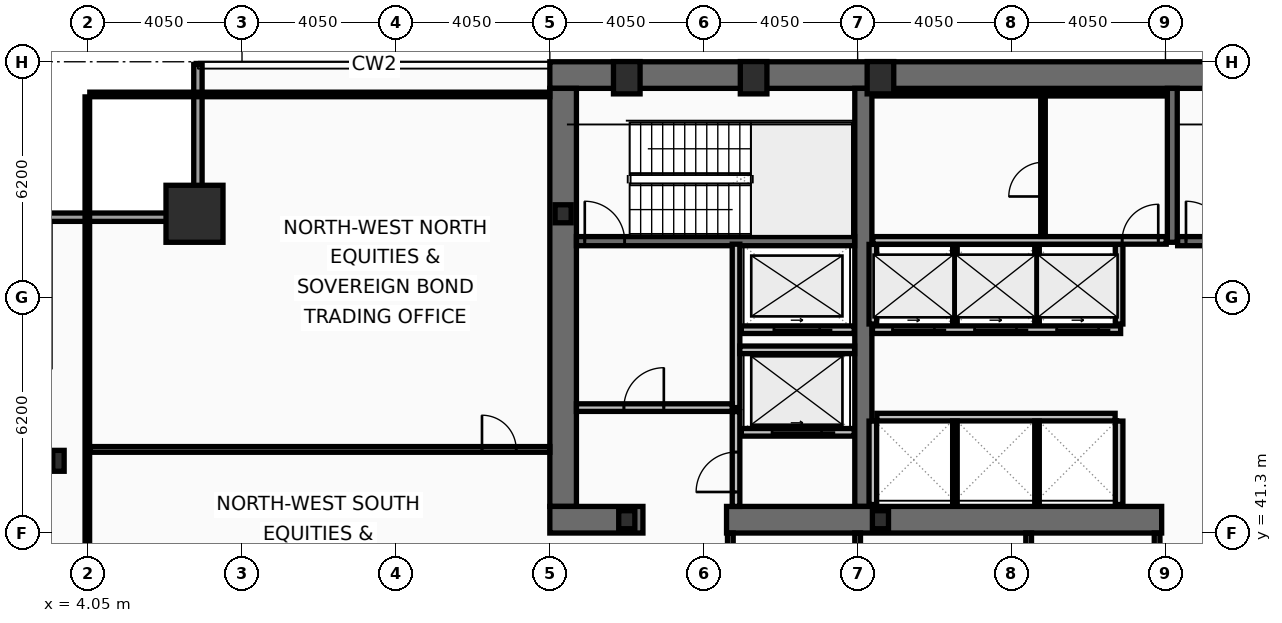
"""IFC4 building model, lengths in metres.
Left out: names, types, materials, properties, quantities, classifications, styles, units other than length and angle.
Written with IfcOpenShell. Run it as: python <this file> out.ifc"""

import sys

from ifc_helpers import new_model, si_unit, direction, frame, frame_2d, origin, origin_2d, place, context, subcontext, project, spatial, rectangle, hollow_rectangle, i_section, extrude, element, fill, save


model = new_model("IFC4")
c1 = context("Model", 3, precision=1e-05, world=origin(), true_north=direction((0.0, 1.0)))
c2 = subcontext(c1, "Body", "Model", "MODEL_VIEW")
j1 = project(units=[si_unit("LENGTHUNIT", "METRE"), si_unit("PLANEANGLEUNIT", "RADIAN")], contexts=[c1])
p1 = place(None, origin())
s1 = spatial("IfcSite", under=j1, at=p1, CompositionType="ELEMENT")
p2 = place(p1, origin())
s2 = spatial("IfcBuilding", under=s1, at=p2, CompositionType="ELEMENT")
p3 = place(p2, frame((0.0, 0.0, 90.6)))
s3 = spatial("IfcBuildingStorey", under=s2, at=p3, CompositionType="ELEMENT", Elevation=90.6)
p4 = place(p3, frame((16.2, 53.35, 0.0), z_axis=(0.0, 0.0, 1.0), x_axis=(1.0, 0.0, 0.0)))
e1 = element("IfcWall", 1, at=p4, inside=s3, PredefinedType="SHEAR", context=c2, shape_type="SweptSolid", body=[
    extrude(rectangle(XDim=40.5, YDim=0.7, at=frame_2d((20.25, 0.0))), origin(), (0.0, 0.0, 1.0), 3.82),
])
p5 = place(p3, frame((16.55, 42.0, 0.0), z_axis=(0.0, 0.0, 1.0), x_axis=(0.0, 1.0, 0.0)))
e2 = element("IfcWall", 2, at=p5, inside=s3, PredefinedType="SHEAR", context=c2, shape_type="SweptSolid", body=[
    extrude(rectangle(XDim=11.0, YDim=0.7, at=frame_2d((5.5, 0.0))), origin(), (0.0, 0.0, 1.0), 3.82),
])
p6 = place(p3, frame((24.45, 42.0, 0.0), z_axis=(0.0, 0.0, 1.0), x_axis=(0.0, 1.0, 0.0)))
e3 = element("IfcWall", 3, at=p6, inside=s3, PredefinedType="SHEAR", context=c2, shape_type="SweptSolid", body=[
    extrude(rectangle(XDim=11.0, YDim=0.45, at=frame_2d((5.5, 0.0))), origin(), (0.0, 0.0, 1.0), 3.82),
])
p7 = place(p3, frame((18.65, 41.65, 0.0), z_axis=(0.0, 0.0, 1.0), x_axis=(-1.0, 0.0, 0.0)))
e4 = element("IfcWall", 4, at=p7, inside=s3, PredefinedType="SHEAR", context=c2, shape_type="SweptSolid", body=[
    extrude(rectangle(XDim=2.45, YDim=0.7, at=frame_2d((1.225, 0.0))), origin(), (0.0, 0.0, 1.0), 3.82),
])
p8 = place(p3, frame((32.3, 41.65, 0.0), z_axis=(0.0, 0.0, 1.0), x_axis=(-1.0, 0.0, 0.0)))
e5 = element("IfcWall", 5, at=p8, inside=s3, PredefinedType="SHEAR", context=c2, shape_type="SweptSolid", body=[
    extrude(rectangle(XDim=11.45, YDim=0.7, at=frame_2d((5.725, 0.0))), origin(), (0.0, 0.0, 1.0), 3.82),
])
p9 = place(p3, frame((32.58, 48.95, 0.0), z_axis=(0.0, 0.0, 1.0), x_axis=(0.0, 1.0, 0.0)))
e6 = element("IfcWall", 6, at=p9, inside=s3, PredefinedType="SHEAR", context=c2, shape_type="SweptSolid", body=[
    extrude(rectangle(XDim=4.05, YDim=0.26, at=frame_2d((2.025, 0.0))), origin(), (0.0, 0.0, 1.0), 3.82),
])
p10 = place(p3, frame((16.9, 48.98, 0.0), z_axis=(0.0, 0.0, 1.0), x_axis=(1.0, 0.0, 0.0)))
e7 = element("IfcWall", 7, at=p10, inside=s3, PredefinedType="SHEAR", context=c2, shape_type="SweptSolid", body=[
    extrude(rectangle(XDim=7.32, YDim=0.24, at=frame_2d((3.66, 0.0))), origin(), (0.0, 0.0, 1.0), 3.82),
])
p11 = place(p10, frame((0.22, 0.0, 0.0)))
e8 = element("IfcOpeningElement", 8, at=p11, cuts=e7, PredefinedType="OPENING", context=c2, shape_type="SweptSolid", body=[
    extrude(rectangle(XDim=1.05, YDim=2.15, at=frame_2d((0.525, 1.075))), frame((0.0, 0.13, 0.0), z_axis=(0.0, -1.0, 0.0), x_axis=(1.0, 0.0, 0.0)), (0.0, 0.0, 1.0), 0.26),
])
p12 = place(p3, frame((32.72, 48.98, 0.0), z_axis=(0.0, 0.0, 1.0), x_axis=(1.0, 0.0, 0.0)))
e9 = element("IfcWall", 9, at=p12, inside=s3, PredefinedType="SHEAR", context=c2, shape_type="SweptSolid", body=[
    extrude(rectangle(XDim=7.56, YDim=0.24, at=frame_2d((3.78, 0.0))), origin(), (0.0, 0.0, 1.0), 3.82),
])
p13 = place(p12, frame((0.22, 0.0, 0.0)))
e10 = element("IfcOpeningElement", 10, at=p13, cuts=e9, PredefinedType="OPENING", context=c2, shape_type="SweptSolid", body=[
    extrude(rectangle(XDim=1.05, YDim=2.15, at=frame_2d((0.525, 1.075))), frame((0.0, 0.13, 0.0), z_axis=(0.0, -1.0, 0.0), x_axis=(1.0, 0.0, 0.0)), (0.0, 0.0, 1.0), 0.26),
])
p14 = place(p3, frame((6.85, 49.7, 0.0), z_axis=(0.0, 0.0, 1.0), x_axis=(1.0, 0.0, 0.0)))
e11 = element("IfcColumn", 11, at=p14, inside=s3, PredefinedType="COLUMN", context=c2, shape_type="SweptSolid", body=[
    extrude(hollow_rectangle(XDim=1.5, YDim=1.5, WallThickness=0.07, at=origin_2d()), origin(), (0.0, 0.0, 1.0), 4.0),
])
for number, where, z_axis, x_axis in (
    (12, (18.225, 53.28, 0.0), (0.0, 0.0, 1.0), (1.0, 0.0, 0.0)),
    (13, (21.562, 53.28, 0.0), (0.0, 0.0, 1.0), (1.0, 0.0, 0.0)),
    (14, (24.9, 53.28, 0.0), (0.0, 0.0, 1.0), (1.0, 0.0, 0.0)),
):
    element("IfcColumn", number, at=place(p3, frame(where, z_axis=z_axis, x_axis=x_axis)), inside=s3, PredefinedType="COLUMN", context=c2, shape_type="SweptSolid", body=[
        extrude(hollow_rectangle(XDim=0.7, YDim=0.85, WallThickness=0.05, at=origin_2d()), origin(), (0.0, 0.0, 1.0), 4.0),
    ])
p15 = place(p3, frame((3.27, 43.2, 0.0), z_axis=(0.0, 0.0, 1.0), x_axis=(1.0, 0.0, 0.0)))
e15 = element("IfcColumn", 15, at=p15, inside=s3, PredefinedType="COLUMN", context=c2, shape_type="SweptSolid", body=[
    extrude(i_section(OverallWidth=0.3, OverallDepth=0.55, WebThickness=0.015, FlangeThickness=0.029, at=origin_2d()), origin(), (0.0, 0.0, 1.0), 4.0),
])
for number, where, z_axis, x_axis in (
    (16, (16.55, 49.7, 0.0), (0.0, 0.0, 1.0), (1.0, 0.0, 0.0)),
    (17, (18.225, 41.65, 0.0), (0.0, 0.0, 1.0), (1.0, 0.0, 0.0)),
    (18, (24.9, 41.65, 0.0), (0.0, 0.0, 1.0), (1.0, 0.0, 0.0)),
):
    element("IfcColumn", number, at=place(p3, frame(where, z_axis=z_axis, x_axis=x_axis)), inside=s3, PredefinedType="COLUMN", context=c2, shape_type="SweptSolid", body=[
        extrude(i_section(OverallWidth=0.424, OverallDepth=0.474, WebThickness=0.048, FlangeThickness=0.077, at=origin_2d()), origin(), (0.0, 0.0, 1.0), 4.0),
    ])
p16 = place(p3, frame((2.83, 49.61, 0.0), z_axis=(0.0, 0.0, 1.0), x_axis=(1.0, 0.0, 0.0)))
e19 = element("IfcWall", 19, at=p16, inside=s3, PredefinedType="SOLIDWALL", context=c2, shape_type="SweptSolid", body=[
    extrude(rectangle(XDim=4.22, YDim=0.22, at=frame_2d((2.11, 0.0))), origin(), (0.0, 0.0, 1.0), 3.16),
])
p17 = place(p3, frame((6.94, 49.72, 0.0), z_axis=(0.0, 0.0, 1.0), x_axis=(0.0, 1.0, 0.0)))
e20 = element("IfcWall", 20, at=p17, inside=s3, PredefinedType="SOLIDWALL", context=c2, shape_type="SweptSolid", body=[
    extrude(rectangle(XDim=3.91, YDim=0.22, at=frame_2d((1.955, 0.0))), origin(), (0.0, 0.0, 1.0), 3.16),
])
p18 = place(p3, frame((24.21, 43.95, 0.0), z_axis=(0.0, 0.0, 1.0), x_axis=(-1.0, 0.0, 0.0)))
e21 = element("IfcWall", 21, at=p18, inside=s3, PredefinedType="PARTITIONING", context=c2, shape_type="SweptSolid", body=[
    extrude(rectangle(XDim=2.97, YDim=0.2, at=frame_2d((1.485, 0.0))), origin(), (0.0, 0.0, 1.0), 3.82),
])
p19 = place(p18, frame((0.86, 0.0, 0.0)))
e22 = element("IfcOpeningElement", 22, at=p19, cuts=e21, PredefinedType="OPENING", context=c2, shape_type="SweptSolid", body=[
    extrude(rectangle(XDim=1.3, YDim=2.18, at=frame_2d((0.65, 1.09))), frame((0.0, 0.11, 0.0), z_axis=(0.0, -1.0, 0.0), x_axis=(1.0, 0.0, 0.0)), (0.0, 0.0, 1.0), 0.22),
])
p20 = place(p3, frame((24.21, 46.65, 0.0), z_axis=(0.0, 0.0, 1.0), x_axis=(-1.0, 0.0, 0.0)))
e23 = element("IfcWall", 23, at=p20, inside=s3, PredefinedType="PARTITIONING", context=c2, shape_type="SweptSolid", body=[
    extrude(rectangle(XDim=2.97, YDim=0.2, at=frame_2d((1.485, 0.0))), origin(), (0.0, 0.0, 1.0), 3.82),
])
p21 = place(p20, frame((0.91, 0.0, 0.0)))
e24 = element("IfcOpeningElement", 24, at=p21, cuts=e23, PredefinedType="OPENING", context=c2, shape_type="SweptSolid", body=[
    extrude(rectangle(XDim=1.2, YDim=2.18, at=frame_2d((0.6, 1.09))), frame((0.0, 0.11, 0.0), z_axis=(0.0, -1.0, 0.0), x_axis=(1.0, 0.0, 0.0)), (0.0, 0.0, 1.0), 0.22),
])
p22 = place(p3, frame((31.22, 46.65, 0.0), z_axis=(0.0, 0.0, 1.0), x_axis=(-1.0, 0.0, 0.0)))
e25 = element("IfcWall", 25, at=p22, inside=s3, PredefinedType="PARTITIONING", context=c2, shape_type="SweptSolid", body=[
    extrude(rectangle(XDim=6.53, YDim=0.2, at=frame_2d((3.265, 0.0))), origin(), (0.0, 0.0, 1.0), 3.82),
])
p23 = place(p22, frame((4.9, 0.0, 0.0)))
e26 = element("IfcOpeningElement", 26, at=p23, cuts=e25, PredefinedType="OPENING", context=c2, shape_type="SweptSolid", body=[
    extrude(rectangle(XDim=1.1, YDim=2.18, at=frame_2d((0.55, 1.09))), frame((0.0, 0.11, 0.0), z_axis=(0.0, -1.0, 0.0), x_axis=(1.0, 0.0, 0.0)), (0.0, 0.0, 1.0), 0.22),
])
p24 = place(p22, frame((2.74, 0.0, 0.0)))
e27 = element("IfcOpeningElement", 27, at=p24, cuts=e25, PredefinedType="OPENING", context=c2, shape_type="SweptSolid", body=[
    extrude(rectangle(XDim=1.1, YDim=2.18, at=frame_2d((0.55, 1.09))), frame((0.0, 0.11, 0.0), z_axis=(0.0, -1.0, 0.0), x_axis=(1.0, 0.0, 0.0)), (0.0, 0.0, 1.0), 0.22),
])
p25 = place(p22, frame((0.58, 0.0, 0.0)))
e28 = element("IfcOpeningElement", 28, at=p25, cuts=e25, PredefinedType="OPENING", context=c2, shape_type="SweptSolid", body=[
    extrude(rectangle(XDim=1.1, YDim=2.18, at=frame_2d((0.55, 1.09))), frame((0.0, 0.11, 0.0), z_axis=(0.0, -1.0, 0.0), x_axis=(1.0, 0.0, 0.0)), (0.0, 0.0, 1.0), 0.22),
])
p26 = place(p3, frame((21.1, 44.6, 0.0), z_axis=(0.0, 0.0, 1.0), x_axis=(0.0, 1.0, 0.0)))
e29 = element("IfcWall", 29, at=p26, inside=s3, PredefinedType="PARTITIONING", context=c2, shape_type="SweptSolid", body=[
    extrude(rectangle(XDim=4.3, YDim=0.2, at=frame_2d((2.15, 0.0))), origin(), (0.0, 0.0, 1.0), 3.82),
])
p27 = place(p3, frame((16.9, 44.6, 0.0), z_axis=(0.0, 0.0, 1.0), x_axis=(1.0, 0.0, 0.0)))
e30 = element("IfcWall", 30, at=p27, inside=s3, PredefinedType="PARTITIONING", context=c2, shape_type="SweptSolid", body=[
    extrude(rectangle(XDim=4.1, YDim=0.2, at=frame_2d((2.05, 0.0))), origin(), (0.0, 0.0, 1.0), 3.82),
])
p28 = place(p27, frame((1.25, 0.0, 0.0)))
e31 = element("IfcOpeningElement", 31, at=p28, cuts=e30, PredefinedType="OPENING", context=c2, shape_type="SweptSolid", body=[
    extrude(rectangle(XDim=1.05, YDim=2.15, at=frame_2d((0.525, 1.075))), frame((0.0, 0.11, 0.0), z_axis=(0.0, -1.0, 0.0), x_axis=(1.0, 0.0, 0.0)), (0.0, 0.0, 1.0), 0.22),
])
p29 = place(p3, frame((21.2, 46.12, 0.0), z_axis=(0.0, 0.0, 1.0), x_axis=(1.0, 0.0, 0.0)))
e32 = element("IfcWall", 32, at=p29, inside=s3, PredefinedType="PARTITIONING", context=c2, shape_type="SweptSolid", body=[
    extrude(rectangle(XDim=3.02, YDim=0.2, at=frame_2d((1.51, 0.0))), origin(), (0.0, 0.0, 1.0), 3.82),
])
p30 = place(p3, frame((21.1, 42.0, 0.0), z_axis=(0.0, 0.0, 1.0), x_axis=(0.0, 1.0, 0.0)))
e33 = element("IfcWall", 33, at=p30, inside=s3, PredefinedType="PARTITIONING", context=c2, shape_type="SweptSolid", body=[
    extrude(rectangle(XDim=2.495, YDim=0.2, at=frame_2d((1.248, 0.0))), origin(), (0.0, 0.0, 1.0), 3.82),
])
p31 = place(p30, frame((0.38, 0.0, 0.0)))
e34 = element("IfcOpeningElement", 34, at=p31, cuts=e33, PredefinedType="OPENING", context=c2, shape_type="SweptSolid", body=[
    extrude(rectangle(XDim=1.05, YDim=2.15, at=frame_2d((0.525, 1.075))), frame((0.0, 0.11, 0.0), z_axis=(0.0, -1.0, 0.0), x_axis=(1.0, 0.0, 0.0)), (0.0, 0.0, 1.0), 0.22),
])
for number, where, z_axis, x_axis in (
    (35, (24.7, 46.8, 0.0), (0.0, 0.0, 1.0), (0.0, 1.0, 0.0)),
    (36, (31.18, 46.8, 0.0), (0.0, 0.0, 1.0), (0.0, 1.0, 0.0)),
):
    element("IfcWall", number, at=place(p3, frame(where, z_axis=z_axis, x_axis=x_axis)), inside=s3, PredefinedType="PARTITIONING", context=c2, shape_type="SweptSolid", body=[
        extrude(rectangle(XDim=2.095, YDim=0.2, at=frame_2d((1.047, 0.0))), origin(), (0.0, 0.0, 1.0), 3.82),
    ])
for number, where, z_axis, x_axis in (
    (37, (26.86, 46.8, 0.0), (0.0, 0.0, 1.0), (0.0, 1.0, 0.0)),
    (38, (29.02, 46.8, 0.0), (0.0, 0.0, 1.0), (0.0, 1.0, 0.0)),
):
    element("IfcWall", number, at=place(p3, frame(where, z_axis=z_axis, x_axis=x_axis)), inside=s3, PredefinedType="PARTITIONING", context=c2, shape_type="SweptSolid", body=[
        extrude(rectangle(XDim=2.095, YDim=0.12, at=frame_2d((1.047, 0.0))), origin(), (0.0, 0.0, 1.0), 3.82),
    ])
p32 = place(p3, frame((24.805, 44.35, 0.0), z_axis=(0.0, 0.0, 1.0), x_axis=(1.0, 0.0, 0.0)))
e39 = element("IfcWall", 39, at=p32, inside=s3, PredefinedType="PARTITIONING", context=c2, shape_type="SweptSolid", body=[
    extrude(rectangle(XDim=6.27, YDim=0.2, at=frame_2d((3.135, 0.0))), origin(), (0.0, 0.0, 1.0), 3.82),
])
for number, where, z_axis, x_axis in (
    (40, (24.7, 42.05, 0.0), (0.0, 0.0, 1.0), (0.0, 1.0, 0.0)),
    (41, (31.18, 42.05, 0.0), (0.0, 0.0, 1.0), (0.0, 1.0, 0.0)),
):
    element("IfcWall", number, at=place(p3, frame(where, z_axis=z_axis, x_axis=x_axis)), inside=s3, PredefinedType="PARTITIONING", context=c2, shape_type="SweptSolid", body=[
        extrude(rectangle(XDim=2.195, YDim=0.2, at=frame_2d((1.098, 0.0))), origin(), (0.0, 0.0, 1.0), 3.82),
    ])
for number, where, z_axis, x_axis in (
    (42, (26.86, 42.05, 0.0), (0.0, 0.0, 1.0), (0.0, 1.0, 0.0)),
    (43, (29.02, 42.05, 0.0), (0.0, 0.0, 1.0), (0.0, 1.0, 0.0)),
):
    element("IfcWall", number, at=place(p3, frame(where, z_axis=z_axis, x_axis=x_axis)), inside=s3, PredefinedType="PARTITIONING", context=c2, shape_type="SweptSolid", body=[
        extrude(rectangle(XDim=2.195, YDim=0.12, at=frame_2d((1.098, 0.0))), origin(), (0.0, 0.0, 1.0), 3.82),
    ])
p33 = place(p3, frame((24.7, 52.86, 0.0), z_axis=(0.0, 0.0, 1.0), x_axis=(1.0, 0.0, 0.0)))
e44 = element("IfcWall", 44, at=p33, inside=s3, PredefinedType="PARTITIONING", context=c2, shape_type="SweptSolid", body=[
    extrude(rectangle(XDim=7.72, YDim=0.12, at=frame_2d((3.86, 0.0))), origin(), (0.0, 0.0, 1.0), 3.82),
])
p34 = place(p3, frame((24.7, 49.0, 0.0), z_axis=(0.0, 0.0, 1.0), x_axis=(1.0, 0.0, 0.0)))
e45 = element("IfcWall", 45, at=p34, inside=s3, PredefinedType="PARTITIONING", context=c2, shape_type="SweptSolid", body=[
    extrude(rectangle(XDim=7.72, YDim=0.2, at=frame_2d((3.86, 0.0))), origin(), (0.0, 0.0, 1.0), 3.82),
])
p35 = place(p34, frame((6.56, 0.0, 0.0)))
e46 = element("IfcOpeningElement", 46, at=p35, cuts=e45, PredefinedType="OPENING", context=c2, shape_type="SweptSolid", body=[
    extrude(rectangle(XDim=0.95, YDim=2.1, at=frame_2d((0.475, 1.05))), frame((0.0, 0.11, 0.0), z_axis=(0.0, -1.0, 0.0), x_axis=(1.0, 0.0, 0.0)), (0.0, 0.0, 1.0), 0.22),
])
p36 = place(p3, frame((29.177, 49.105, 0.0), z_axis=(0.0, 0.0, 1.0), x_axis=(0.0, 1.0, 0.0)))
e47 = element("IfcWall", 47, at=p36, inside=s3, PredefinedType="PARTITIONING", context=c2, shape_type="SweptSolid", body=[
    extrude(rectangle(XDim=3.69, YDim=0.12, at=frame_2d((1.845, 0.0))), origin(), (0.0, 0.0, 1.0), 3.82),
])
p37 = place(p36, frame((1.05, 0.0, 0.0)))
e48 = element("IfcOpeningElement", 48, at=p37, cuts=e47, PredefinedType="OPENING", context=c2, shape_type="SweptSolid", body=[
    extrude(rectangle(XDim=0.9, YDim=2.05, at=frame_2d((0.45, 1.025))), frame((0.0, 0.07, 0.0), z_axis=(0.0, -1.0, 0.0), x_axis=(1.0, 0.0, 0.0)), (0.0, 0.0, 1.0), 0.14),
])
for number, where, z_axis, x_axis in (
    (49, (20.95, 38.28, 0.0), (0.0, 0.0, 1.0), (0.0, 1.0, 0.0)),
    (50, (24.3, 38.28, 0.0), (0.0, 0.0, 1.0), (0.0, 1.0, 0.0)),
    (51, (28.8, 38.28, 0.0), (0.0, 0.0, 1.0), (0.0, 1.0, 0.0)),
    (52, (32.18, 38.28, 0.0), (0.0, 0.0, 1.0), (0.0, 1.0, 0.0)),
):
    element("IfcWall", number, at=place(p3, frame(where, z_axis=z_axis, x_axis=x_axis)), inside=s3, PredefinedType="PARTITIONING", context=c2, shape_type="SweptSolid", body=[
        extrude(rectangle(XDim=3.02, YDim=0.15, at=frame_2d((1.51, 0.0))), origin(), (0.0, 0.0, 1.0), 3.82),
    ])
p38 = place(p3, frame((4.095, 43.5, 0.0), z_axis=(0.0, 0.0, 1.0), x_axis=(1.0, 0.0, 0.0)))
e53 = element("IfcWall", 53, at=p38, inside=s3, PredefinedType="PARTITIONING", context=c2, shape_type="SweptSolid", body=[
    extrude(rectangle(XDim=12.105, YDim=0.15, at=frame_2d((6.052, 0.0))), origin(), (0.0, 0.0, 1.0), 3.01),
])
p39 = place(p38, frame((10.32, 0.0, 0.0)))
e54 = element("IfcOpeningElement", 54, at=p39, cuts=e53, PredefinedType="OPENING", context=c2, shape_type="SweptSolid", body=[
    extrude(rectangle(XDim=0.9, YDim=2.05, at=frame_2d((0.45, 1.025))), frame((0.0, 0.085, 0.0), z_axis=(0.0, -1.0, 0.0), x_axis=(1.0, 0.0, 0.0)), (0.0, 0.0, 1.0), 0.17),
])
p40 = place(p3, frame((4.03, 10.665, 0.0), z_axis=(0.0, 0.0, 1.0), x_axis=(0.0, 1.0, 0.0)))
e55 = element("IfcWall", 55, at=p40, inside=s3, PredefinedType="PARTITIONING", context=c2, shape_type="SweptSolid", body=[
    extrude(rectangle(XDim=42.11, YDim=0.12, at=frame_2d((21.055, 0.0))), origin(), (0.0, 0.0, 1.0), 3.01),
])
p41 = place(p3, frame((4.095, 52.84, 0.0), z_axis=(0.0, 0.0, 1.0), x_axis=(1.0, 0.0, 0.0)))
e56 = element("IfcWall", 56, at=p41, inside=s3, PredefinedType="PARTITIONING", context=c2, shape_type="SweptSolid", body=[
    extrude(rectangle(XDim=12.105, YDim=0.12, at=frame_2d((6.052, 0.0))), origin(), (0.0, 0.0, 1.0), 3.82),
])
p42 = place(p11, origin())
e57 = element("IfcDoor", 57, at=p42, inside=s3, OperationType="SINGLE_SWING_LEFT", PredefinedType="DOOR", context=c2, shape_type="SweptSolid", body=[
    extrude(rectangle(XDim=1.05, YDim=2.15, at=frame_2d((0.525, 1.075))), frame((0.0, 0.025, 0.0), z_axis=(0.0, -1.0, 0.0), x_axis=(1.0, 0.0, 0.0)), (0.0, 0.0, 1.0), 0.05),
])
fill(e8, e57)
p43 = place(p13, origin())
e58 = element("IfcDoor", 58, at=p43, inside=s3, OperationType="SINGLE_SWING_LEFT", PredefinedType="DOOR", context=c2, shape_type="SweptSolid", body=[
    extrude(rectangle(XDim=1.05, YDim=2.15, at=frame_2d((0.525, 1.075))), frame((0.0, 0.025, 0.0), z_axis=(0.0, -1.0, 0.0), x_axis=(1.0, 0.0, 0.0)), (0.0, 0.0, 1.0), 0.05),
])
fill(e10, e58)
p44 = place(p19, origin())
e59 = element("IfcDoor", 59, at=p44, inside=s3, OperationType="SLIDING_TO_LEFT", PredefinedType="DOOR", context=c2, shape_type="SweptSolid", body=[
    extrude(rectangle(XDim=1.3, YDim=2.18, at=frame_2d((0.65, 1.09))), frame((0.0, 0.025, 0.0), z_axis=(0.0, -1.0, 0.0), x_axis=(1.0, 0.0, 0.0)), (0.0, 0.0, 1.0), 0.05),
])
fill(e22, e59)
p45 = place(p21, origin())
e60 = element("IfcDoor", 60, at=p45, inside=s3, OperationType="SLIDING_TO_LEFT", PredefinedType="DOOR", context=c2, shape_type="SweptSolid", body=[
    extrude(rectangle(XDim=1.2, YDim=2.18, at=frame_2d((0.6, 1.09))), frame((0.0, 0.025, 0.0), z_axis=(0.0, -1.0, 0.0), x_axis=(1.0, 0.0, 0.0)), (0.0, 0.0, 1.0), 0.05),
])
fill(e24, e60)
p46 = place(p23, origin())
e61 = element("IfcDoor", 61, at=p46, inside=s3, OperationType="SLIDING_TO_LEFT", PredefinedType="DOOR", context=c2, shape_type="SweptSolid", body=[
    extrude(rectangle(XDim=1.1, YDim=2.18, at=frame_2d((0.55, 1.09))), frame((0.0, 0.025, 0.0), z_axis=(0.0, -1.0, 0.0), x_axis=(1.0, 0.0, 0.0)), (0.0, 0.0, 1.0), 0.05),
])
fill(e26, e61)
p47 = place(p24, origin())
e62 = element("IfcDoor", 62, at=p47, inside=s3, OperationType="SLIDING_TO_LEFT", PredefinedType="DOOR", context=c2, shape_type="SweptSolid", body=[
    extrude(rectangle(XDim=1.1, YDim=2.18, at=frame_2d((0.55, 1.09))), frame((0.0, 0.025, 0.0), z_axis=(0.0, -1.0, 0.0), x_axis=(1.0, 0.0, 0.0)), (0.0, 0.0, 1.0), 0.05),
])
fill(e27, e62)
p48 = place(p25, origin())
e63 = element("IfcDoor", 63, at=p48, inside=s3, OperationType="SLIDING_TO_LEFT", PredefinedType="DOOR", context=c2, shape_type="SweptSolid", body=[
    extrude(rectangle(XDim=1.1, YDim=2.18, at=frame_2d((0.55, 1.09))), frame((0.0, 0.025, 0.0), z_axis=(0.0, -1.0, 0.0), x_axis=(1.0, 0.0, 0.0)), (0.0, 0.0, 1.0), 0.05),
])
fill(e28, e63)
p49 = place(p28, origin())
e64 = element("IfcDoor", 64, at=p49, inside=s3, OperationType="SINGLE_SWING_RIGHT", PredefinedType="DOOR", context=c2, shape_type="SweptSolid", body=[
    extrude(rectangle(XDim=1.05, YDim=2.15, at=frame_2d((0.525, 1.075))), frame((0.0, 0.025, 0.0), z_axis=(0.0, -1.0, 0.0), x_axis=(1.0, 0.0, 0.0)), (0.0, 0.0, 1.0), 0.05),
])
fill(e31, e64)
p50 = place(p31, origin())
e65 = element("IfcDoor", 65, at=p50, inside=s3, OperationType="SINGLE_SWING_LEFT", PredefinedType="DOOR", context=c2, shape_type="SweptSolid", body=[
    extrude(rectangle(XDim=1.05, YDim=2.15, at=frame_2d((0.525, 1.075))), frame((0.0, 0.025, 0.0), z_axis=(0.0, -1.0, 0.0), x_axis=(1.0, 0.0, 0.0)), (0.0, 0.0, 1.0), 0.05),
])
fill(e34, e65)
p51 = place(p35, origin())
e66 = element("IfcDoor", 66, at=p51, inside=s3, OperationType="SINGLE_SWING_RIGHT", PredefinedType="DOOR", context=c2, shape_type="SweptSolid", body=[
    extrude(rectangle(XDim=0.95, YDim=2.1, at=frame_2d((0.475, 1.05))), frame((0.0, 0.025, 0.0), z_axis=(0.0, -1.0, 0.0), x_axis=(1.0, 0.0, 0.0)), (0.0, 0.0, 1.0), 0.05),
])
fill(e46, e66)
p52 = place(p37, origin())
e67 = element("IfcDoor", 67, at=p52, inside=s3, OperationType="SINGLE_SWING_LEFT", PredefinedType="DOOR", context=c2, shape_type="SweptSolid", body=[
    extrude(rectangle(XDim=0.9, YDim=2.05, at=frame_2d((0.45, 1.025))), frame((0.0, 0.025, 0.0), z_axis=(0.0, -1.0, 0.0), x_axis=(1.0, 0.0, 0.0)), (0.0, 0.0, 1.0), 0.05),
])
fill(e48, e67)
p53 = place(p39, origin())
e68 = element("IfcDoor", 68, at=p53, inside=s3, OperationType="SINGLE_SWING_LEFT", PredefinedType="DOOR", context=c2, shape_type="SweptSolid", body=[
    extrude(rectangle(XDim=0.9, YDim=2.05, at=frame_2d((0.45, 1.025))), frame((0.0, 0.025, 0.0), z_axis=(0.0, -1.0, 0.0), x_axis=(1.0, 0.0, 0.0)), (0.0, 0.0, 1.0), 0.05),
])
fill(e54, e68)
save(model, sys.argv[1])
